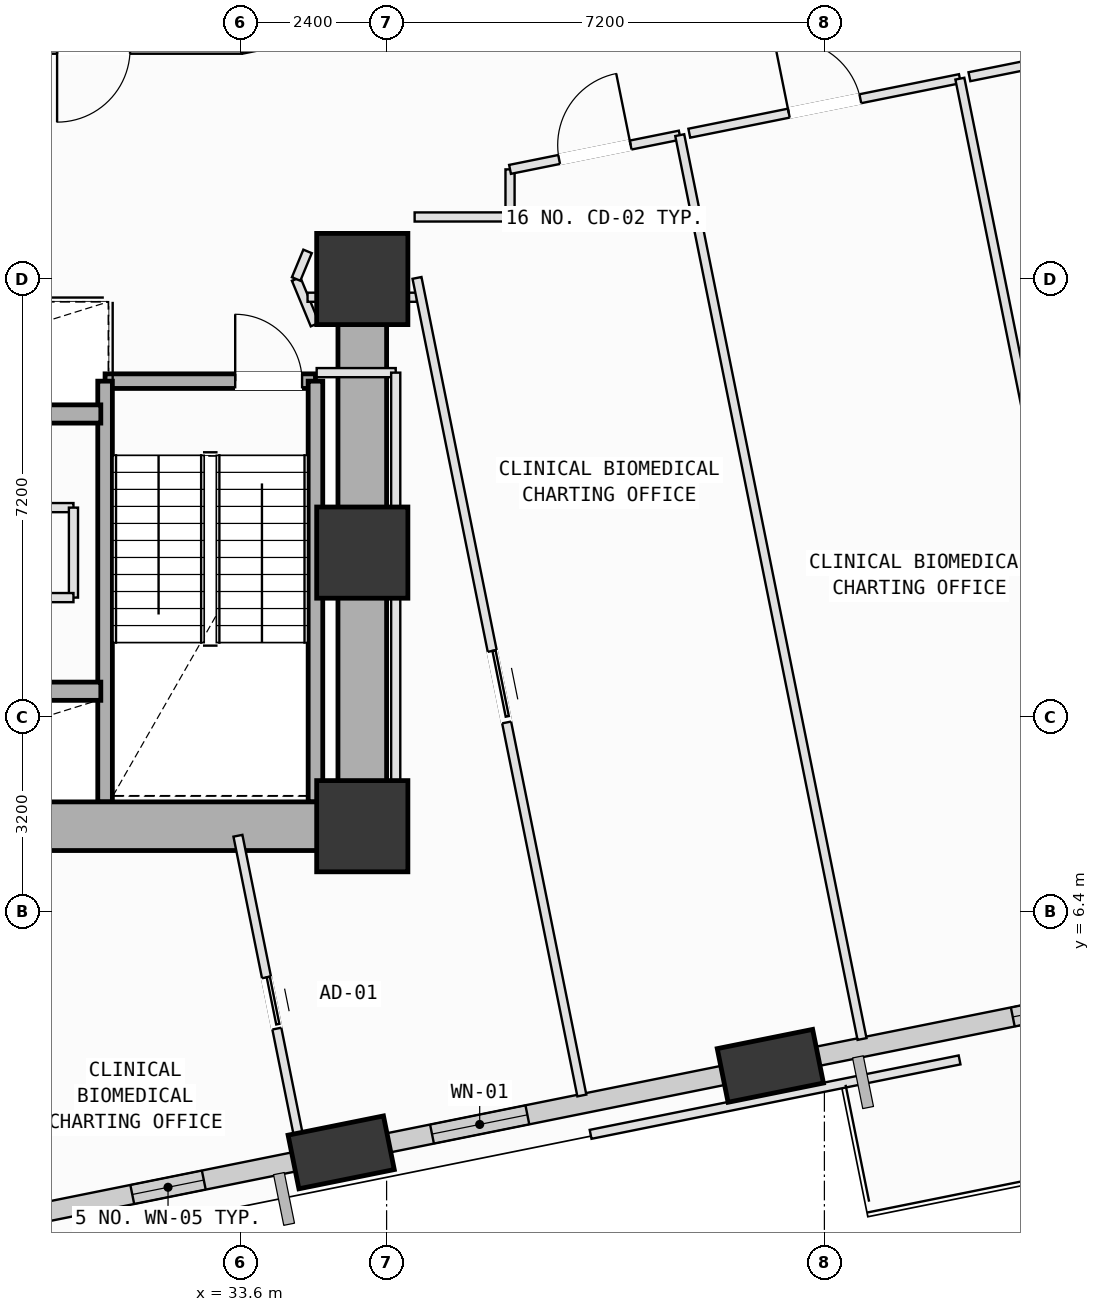
"""IFC4 building model, lengths in metres.
Left out: names, types, materials, properties, quantities, classifications, styles, units other than length and angle.
Written with IfcOpenShell. Run it as: python <this file> out.ifc"""

import sys

from ifc_helpers import new_model, si_unit, direction, frame, frame_2d, origin, origin_2d, place, context, subcontext, project, spatial, rectangle, extrude, element, fill, save


model = new_model("IFC4")
c1 = context("Model", 3, precision=1e-05, world=origin(), true_north=direction((0.0, 1.0)))
c2 = subcontext(c1, "Body", "Model", "MODEL_VIEW")
j1 = project(units=[si_unit("LENGTHUNIT", "METRE"), si_unit("PLANEANGLEUNIT", "RADIAN")], contexts=[c1])
p1 = place(None, origin())
s1 = spatial("IfcSite", under=j1, at=p1, CompositionType="ELEMENT")
p2 = place(p1, origin())
s2 = spatial("IfcBuilding", under=s1, at=p2, CompositionType="ELEMENT")
p3 = place(p2, frame((0.0, 0.0, 71.0)))
s3 = spatial("IfcBuildingStorey", under=s2, at=p3, CompositionType="ELEMENT", Elevation=71.0)
for number, where, z_axis, x_axis in (
    (1, (35.6, 7.8, 0.0), (0.0, 0.0, 1.0), (1.0, 0.0, 0.0)),
    (2, (35.6, 12.3, 0.0), (0.0, 0.0, 1.0), (1.0, 0.0, 0.0)),
    (3, (35.6, 16.8, 0.0), (0.0, 0.0, 1.0), (1.0, 0.0, 0.0)),
):
    element("IfcColumn", number, at=place(p3, frame(where, z_axis=z_axis, x_axis=x_axis)), inside=s3, PredefinedType="COLUMN", context=c2, shape_type="SweptSolid", body=[
        extrude(rectangle(XDim=1.5, YDim=1.5, at=origin_2d()), origin(), (0.0, 0.0, 1.0), 4.0),
    ])
p4 = place(p3, frame((35.253, 2.436, 0.002), z_axis=(0.092271488704, 0.007603122009, 0.995704858333), x_axis=(-0.27664462741, 0.960798033947, 0.018299947803)))
e4 = element("IfcColumn", 4, at=p4, inside=s3, PredefinedType="COLUMN", context=c2, shape_type="SweptSolid", body=[
    extrude(rectangle(XDim=1.6, YDim=0.9, at=origin_2d()), origin(), (0.0, 0.0, 1.0), 4.014),
])
p5 = place(p3, frame((42.311, 3.859, 0.002), z_axis=(0.086119922168, 0.036673949906, 0.995609552186), x_axis=(-0.565127396469, 0.824796170632, 0.018501423489)))
e5 = element("IfcColumn", 5, at=p5, inside=s3, PredefinedType="COLUMN", context=c2, shape_type="SweptSolid", body=[
    extrude(rectangle(XDim=1.6, YDim=0.9, at=origin_2d()), origin(), (0.0, 0.0, 1.0), 4.014),
])
p6 = place(p3, frame((34.839, 2.352, 0.0), z_axis=(0.0, 0.0, 1.0), x_axis=(-0.980280090352, -0.197613118135, 0.0)))
e6 = element("IfcWall", 6, at=p6, inside=s3, PredefinedType="SOLIDWALL", context=c2, shape_type="SweptSolid", body=[
    extrude(rectangle(XDim=5.99, YDim=0.32, at=frame_2d((2.995, 0.0))), origin(), (0.0, 0.0, 1.0), 3.165),
])
p7 = place(p6, frame((1.882, 0.0, 0.75)))
e7 = element("IfcOpeningElement", 7, at=p7, cuts=e6, PredefinedType="OPENING", context=c2, shape_type="SweptSolid", body=[
    extrude(rectangle(XDim=1.2, YDim=1.75, at=frame_2d((0.6, 0.875))), frame((0.0, 0.17, 0.0), z_axis=(0.0, -1.0, 0.0), x_axis=(1.0, 0.0, 0.0)), (0.0, 0.0, 1.0), 0.34),
])
p8 = place(p3, frame((41.897, 3.775, 0.0), z_axis=(0.0, 0.0, 1.0), x_axis=(-0.980270406687, -0.197661148871, 0.0)))
e8 = element("IfcWall", 8, at=p8, inside=s3, PredefinedType="SOLIDWALL", context=c2, shape_type="SweptSolid", body=[
    extrude(rectangle(XDim=5.986, YDim=0.32, at=frame_2d((2.993, 0.0))), origin(), (0.0, 0.0, 1.0), 3.165),
])
p9 = place(p8, frame((3.654, 0.0, 0.75)))
e9 = element("IfcOpeningElement", 9, at=p9, cuts=e8, PredefinedType="OPENING", context=c2, shape_type="SweptSolid", body=[
    extrude(rectangle(XDim=1.6, YDim=1.95, at=frame_2d((0.8, 0.975))), frame((0.0, 0.17, 0.0), z_axis=(0.0, -1.0, 0.0), x_axis=(1.0, 0.0, 0.0)), (0.0, 0.0, 1.0), 0.34),
])
p10 = place(p3, frame((48.961, 5.199, 0.0), z_axis=(0.0, 0.0, 1.0), x_axis=(-0.980270794901, -0.197659223574, 0.0)))
e10 = element("IfcWall", 10, at=p10, inside=s3, PredefinedType="SOLIDWALL", context=c2, shape_type="SweptSolid", body=[
    extrude(rectangle(XDim=5.993, YDim=0.32, at=frame_2d((2.997, 0.0))), origin(), (0.0, 0.0, 1.0), 3.165),
])
p11 = place(p10, frame((1.516, 0.0, 0.75)))
e11 = element("IfcOpeningElement", 11, at=p11, cuts=e10, PredefinedType="OPENING", context=c2, shape_type="SweptSolid", body=[
    extrude(rectangle(XDim=1.2, YDim=1.75, at=frame_2d((0.6, 0.875))), frame((0.0, 0.17, 0.0), z_axis=(0.0, -1.0, 0.0), x_axis=(1.0, 0.0, 0.0)), (0.0, 0.0, 1.0), 0.34),
])
p12 = place(p3, frame((31.37, 15.12, 0.0), z_axis=(0.0, 0.0, 1.0), x_axis=(1.0, 0.0, 0.0)))
e12 = element("IfcWall", 12, at=p12, inside=s3, PredefinedType="SOLIDWALL", context=c2, shape_type="SweptSolid", body=[
    extrude(rectangle(XDim=3.46, YDim=0.24, at=frame_2d((1.73, 0.0))), origin(), (0.0, 0.0, 1.0), 3.78),
])
p13 = place(p12, frame((2.14, 0.0, 0.0)))
e13 = element("IfcOpeningElement", 13, at=p13, cuts=e12, PredefinedType="OPENING", context=c2, shape_type="SweptSolid", body=[
    extrude(rectangle(XDim=1.1, YDim=2.15, at=frame_2d((0.55, 1.075))), frame((0.0, 0.13, 0.0), z_axis=(0.0, -1.0, 0.0), x_axis=(1.0, 0.0, 0.0)), (0.0, 0.0, 1.0), 0.26),
])
for number, where, z_axis, x_axis in (
    (14, (34.83, 15.12, 0.0), (0.0, 0.0, 1.0), (0.0, -1.0, 0.0)),
    (15, (31.37, 8.2, 0.0), (0.0, 0.0, 1.0), (0.0, 1.0, 0.0)),
):
    element("IfcWall", number, at=place(p3, frame(where, z_axis=z_axis, x_axis=x_axis)), inside=s3, PredefinedType="SOLIDWALL", context=c2, shape_type="SweptSolid", body=[
        extrude(rectangle(XDim=6.92, YDim=0.24, at=frame_2d((3.46, 0.0))), origin(), (0.0, 0.0, 1.0), 3.78),
    ])
p14 = place(p3, frame((24.8, 7.8, 0.0), z_axis=(0.0, 0.0, 1.0), x_axis=(1.0, 0.0, 0.0)))
e16 = element("IfcWall", 16, at=p14, inside=s3, PredefinedType="SHEAR", context=c2, shape_type="SweptSolid", body=[
    extrude(rectangle(XDim=10.8, YDim=0.8, at=frame_2d((5.4, 0.0))), origin(), (0.0, 0.0, 1.0), 3.78),
])
p15 = place(p3, frame((35.6, 7.8, 0.0), z_axis=(0.0, 0.0, 1.0), x_axis=(0.0, 1.0, 0.0)))
e17 = element("IfcWall", 17, at=p15, inside=s3, PredefinedType="SHEAR", context=c2, shape_type="SweptSolid", body=[
    extrude(rectangle(XDim=9.0, YDim=0.8, at=frame_2d((4.5, 0.0))), origin(), (0.0, 0.0, 1.0), 3.78),
])
p16 = place(p3, frame((25.85, 10.02, 0.0), z_axis=(0.0, 0.0, 1.0), x_axis=(1.0, 0.0, 0.0)))
e18 = element("IfcWall", 18, at=p16, inside=s3, PredefinedType="SOLIDWALL", context=c2, shape_type="SweptSolid", body=[
    extrude(rectangle(XDim=5.45, YDim=0.3, at=frame_2d((2.725, 0.0))), origin(), (0.0, 0.0, 1.0), 3.78),
])
p17 = place(p16, frame((0.34, 0.0, 0.0)))
e19 = element("IfcOpeningElement", 19, at=p17, cuts=e18, PredefinedType="OPENING", context=c2, shape_type="SweptSolid", body=[
    extrude(rectangle(XDim=1.12, YDim=2.15, at=frame_2d((0.56, 1.075))), frame((0.0, 0.16, 0.0), z_axis=(0.0, -1.0, 0.0), x_axis=(1.0, 0.0, 0.0)), (0.0, 0.0, 1.0), 0.32),
])
p18 = place(p16, frame((2.24, 0.0, 0.0)))
e20 = element("IfcOpeningElement", 20, at=p18, cuts=e18, PredefinedType="OPENING", context=c2, shape_type="SweptSolid", body=[
    extrude(rectangle(XDim=1.12, YDim=2.15, at=frame_2d((0.56, 1.075))), frame((0.0, 0.16, 0.0), z_axis=(0.0, -1.0, 0.0), x_axis=(1.0, 0.0, 0.0)), (0.0, 0.0, 1.0), 0.32),
])
p19 = place(p3, frame((25.85, 14.58, 0.0), z_axis=(0.0, 0.0, 1.0), x_axis=(1.0, 0.0, 0.0)))
e21 = element("IfcWall", 21, at=p19, inside=s3, PredefinedType="SOLIDWALL", context=c2, shape_type="SweptSolid", body=[
    extrude(rectangle(XDim=5.45, YDim=0.3, at=frame_2d((2.725, 0.0))), origin(), (0.0, 0.0, 1.0), 3.78),
])
p20 = place(p3, frame((26.45, 13.04, 0.0), z_axis=(0.0, 0.0, 1.0), x_axis=(1.0, 0.0, 0.0)))
e22 = element("IfcWall", 22, at=p20, inside=s3, PredefinedType="PARTITIONING", context=c2, shape_type="SweptSolid", body=[
    extrude(rectangle(XDim=4.4, YDim=0.15, at=frame_2d((2.2, 0.0))), origin(), (0.0, 0.0, 1.0), 3.78),
])
p21 = place(p20, frame((1.74, 0.0, 0.0)))
e23 = element("IfcOpeningElement", 23, at=p21, cuts=e22, PredefinedType="OPENING", context=c2, shape_type="SweptSolid", body=[
    extrude(rectangle(XDim=0.92, YDim=2.1, at=frame_2d((0.46, 1.05))), frame((0.0, 0.085, 0.0), z_axis=(0.0, -1.0, 0.0), x_axis=(1.0, 0.0, 0.0)), (0.0, 0.0, 1.0), 0.17),
])
p22 = place(p3, frame((30.85, 13.04, 0.0), z_axis=(0.0, 0.0, 1.0), x_axis=(0.0, -1.0, 0.0)))
e24 = element("IfcWall", 24, at=p22, inside=s3, PredefinedType="PARTITIONING", context=c2, shape_type="SweptSolid", body=[
    extrude(rectangle(XDim=1.48, YDim=0.15, at=frame_2d((0.74, 0.0))), origin(), (0.0, 0.0, 1.0), 3.78),
])
p23 = place(p3, frame((30.85, 11.56, 0.0), z_axis=(0.0, 0.0, 1.0), x_axis=(-1.0, 0.0, 0.0)))
e25 = element("IfcWall", 25, at=p23, inside=s3, PredefinedType="PARTITIONING", context=c2, shape_type="SweptSolid", body=[
    extrude(rectangle(XDim=4.4, YDim=0.15, at=frame_2d((2.2, 0.0))), origin(), (0.0, 0.0, 1.0), 3.78),
])
p24 = place(p3, frame((33.555, 7.643, 0.0), z_axis=(0.0, 0.0, 1.0), x_axis=(0.197717476779, -0.980259047077, 0.0)))
e26 = element("IfcWall", 26, at=p24, inside=s3, PredefinedType="PARTITIONING", context=c2, shape_type="SweptSolid", body=[
    extrude(rectangle(XDim=5.306, YDim=0.15, at=frame_2d((2.653, 0.0))), origin(), (0.0, 0.0, 1.0), 3.78),
])
p25 = place(p24, frame((2.376, 0.0, 0.0)))
e27 = element("IfcOpeningElement", 27, at=p25, cuts=e26, PredefinedType="OPENING", context=c2, shape_type="SweptSolid", body=[
    extrude(rectangle(XDim=0.86, YDim=2.06, at=frame_2d((0.43, 1.03))), frame((0.0, 0.085, 0.0), z_axis=(0.0, -1.0, 0.0), x_axis=(1.0, 0.0, 0.0)), (0.0, 0.0, 1.0), 0.17),
])
p26 = place(p3, frame((36.15, 15.26, 0.0), z_axis=(0.0, 0.0, 1.0), x_axis=(-1.0, 0.0, 0.0)))
e28 = element("IfcWall", 28, at=p26, inside=s3, PredefinedType="PARTITIONING", context=c2, shape_type="SweptSolid", body=[
    extrude(rectangle(XDim=1.3, YDim=0.15, at=frame_2d((0.65, 0.0))), origin(), (0.0, 0.0, 1.0), 3.78),
])
p27 = place(p3, frame((34.822, 16.05, 0.0), z_axis=(0.0, 0.0, 1.0), x_axis=(-0.382050639738, 0.924141389981, 0.0)))
e29 = element("IfcWall", 29, at=p27, inside=s3, PredefinedType="PARTITIONING", context=c2, shape_type="SweptSolid", body=[
    extrude(rectangle(XDim=0.812, YDim=0.15, at=frame_2d((0.406, 0.0))), origin(), (0.0, 0.0, 1.0), 3.78),
])
p28 = place(p3, frame((34.512, 16.8, 0.0), z_axis=(0.0, 0.0, 1.0), x_axis=(0.382673670509, 0.923883575944, 0.0)))
e30 = element("IfcWall", 30, at=p28, inside=s3, PredefinedType="PARTITIONING", context=c2, shape_type="SweptSolid", body=[
    extrude(rectangle(XDim=0.491, YDim=0.15, at=frame_2d((0.246, 0.0))), origin(), (0.0, 0.0, 1.0), 3.78),
])
p29 = place(p3, frame((34.7, 16.5, 0.0), z_axis=(0.0, 0.0, 1.0), x_axis=(1.0, 0.0, 0.0)))
e31 = element("IfcWall", 31, at=p29, inside=s3, PredefinedType="PARTITIONING", context=c2, shape_type="SweptSolid", body=[
    extrude(rectangle(XDim=1.8, YDim=0.15, at=frame_2d((0.9, 0.0))), origin(), (0.0, 0.0, 1.0), 2.865),
])
p30 = place(p3, frame((36.5, 16.818, 0.0), z_axis=(0.0, 0.0, 1.0), x_axis=(0.197625281774, -0.980277638225, 0.0)))
e32 = element("IfcWall", 32, at=p30, inside=s3, PredefinedType="PARTITIONING", context=c2, shape_type="SweptSolid", body=[
    extrude(rectangle(XDim=13.718, YDim=0.15, at=frame_2d((6.859, 0.0))), origin(), (0.0, 0.0, 1.0), 3.78),
])
p31 = place(p30, frame((6.259, 0.0, 0.0)))
e33 = element("IfcOpeningElement", 33, at=p31, cuts=e32, PredefinedType="OPENING", context=c2, shape_type="SweptSolid", body=[
    extrude(rectangle(XDim=1.2, YDim=2.15, at=frame_2d((0.6, 1.075))), frame((0.0, 0.085, 0.0), z_axis=(0.0, -1.0, 0.0), x_axis=(1.0, 0.0, 0.0)), (0.0, 0.0, 1.0), 0.17),
])
p32 = place(p3, frame((36.075, 2.367, 0.0), z_axis=(0.0, 0.0, 1.0), x_axis=(-0.980137701234, -0.198318144961, 0.0)))
e34 = element("IfcWall", 34, at=p32, inside=s3, PredefinedType="PARTITIONING", context=c2, shape_type="SweptSolid", body=[
    extrude(rectangle(XDim=1.215, YDim=0.15, at=frame_2d((0.607, 0.0))), origin(), (0.0, 0.0, 1.0), 3.165),
])
p33 = place(p3, frame((35.6, 7.5, 0.0), z_axis=(0.0, 0.0, 1.0), x_axis=(1.0, 0.0, 0.0)))
e35 = element("IfcWall", 35, at=p33, inside=s3, PredefinedType="PARTITIONING", context=c2, shape_type="SweptSolid", body=[
    extrude(rectangle(XDim=0.55, YDim=0.15, at=frame_2d((0.275, 0.0))), origin(), (0.0, 0.0, 1.0), 3.78),
])
p34 = place(p3, frame((36.15, 7.5, 0.0), z_axis=(0.0, 0.0, 1.0), x_axis=(0.0, 1.0, 0.0)))
e36 = element("IfcWall", 36, at=p34, inside=s3, PredefinedType="PARTITIONING", context=c2, shape_type="SweptSolid", body=[
    extrude(rectangle(XDim=7.76, YDim=0.15, at=frame_2d((3.88, 0.0))), origin(), (0.0, 0.0, 1.0), 3.78),
])
p35 = place(p3, frame((36.461, 17.82, 0.0), z_axis=(0.0, 0.0, 1.0), x_axis=(0.999999801036, 0.000630815203, 0.0)))
e37 = element("IfcWall", 37, at=p35, inside=s3, PredefinedType="PARTITIONING", context=c2, shape_type="SweptSolid", body=[
    extrude(rectangle(XDim=1.548, YDim=0.15, at=frame_2d((0.774, 0.0))), origin(), (0.0, 0.0, 1.0), 3.78),
])
p36 = place(p3, frame((38.03, 17.85, 0.0), z_axis=(0.0, 0.0, 1.0), x_axis=(0.0, 1.0, 0.0)))
e38 = element("IfcWall", 38, at=p36, inside=s3, PredefinedType="PARTITIONING", context=c2, shape_type="SweptSolid", body=[
    extrude(rectangle(XDim=0.753, YDim=0.15, at=frame_2d((0.376, 0.0))), origin(), (0.0, 0.0, 1.0), 3.78),
])
p37 = place(p3, frame((38.03, 18.603, 0.0), z_axis=(0.0, 0.0, 1.0), x_axis=(0.980256145054, 0.197731864109, 0.0)))
e39 = element("IfcWall", 39, at=p37, inside=s3, PredefinedType="PARTITIONING", context=c2, shape_type="SweptSolid", body=[
    extrude(rectangle(XDim=2.847, YDim=0.15, at=frame_2d((1.424, 0.0))), origin(), (0.0, 0.0, 1.0), 3.78),
])
p38 = place(p37, frame((0.823, 0.0, 0.0)))
e40 = element("IfcOpeningElement", 40, at=p38, cuts=e39, PredefinedType="OPENING", context=c2, shape_type="SweptSolid", body=[
    extrude(rectangle(XDim=1.2, YDim=2.15, at=frame_2d((0.6, 1.075))), frame((0.0, 0.085, 0.0), z_axis=(0.0, -1.0, 0.0), x_axis=(1.0, 0.0, 0.0)), (0.0, 0.0, 1.0), 0.17),
])
p39 = place(p3, frame((40.821, 19.166, 0.0), z_axis=(0.0, 0.0, 1.0), x_axis=(0.197691694235, -0.980264247043, 0.0)))
e41 = element("IfcWall", 41, at=p39, inside=s3, PredefinedType="PARTITIONING", context=c2, shape_type="SweptSolid", body=[
    extrude(rectangle(XDim=15.165, YDim=0.15, at=frame_2d((7.583, 0.0))), origin(), (0.0, 0.0, 1.0), 3.78),
])
p40 = place(p3, frame((40.978, 19.198, 0.0), z_axis=(0.0, 0.0, 1.0), x_axis=(0.980283759532, 0.197594915923, 0.0)))
e42 = element("IfcWall", 42, at=p40, inside=s3, PredefinedType="PARTITIONING", context=c2, shape_type="SweptSolid", body=[
    extrude(rectangle(XDim=4.54, YDim=0.15, at=frame_2d((2.27, 0.0))), origin(), (0.0, 0.0, 1.0), 3.78),
])
p41 = place(p40, frame((1.67, 0.0, 0.0)))
e43 = element("IfcOpeningElement", 43, at=p41, cuts=e42, PredefinedType="OPENING", context=c2, shape_type="SweptSolid", body=[
    extrude(rectangle(XDim=1.2, YDim=2.15, at=frame_2d((0.6, 1.075))), frame((0.0, 0.085, 0.0), z_axis=(0.0, -1.0, 0.0), x_axis=(1.0, 0.0, 0.0)), (0.0, 0.0, 1.0), 0.17),
])
p42 = place(p3, frame((45.428, 20.095, 0.0), z_axis=(0.0, 0.0, 1.0), x_axis=(0.197691694235, -0.980264247043, 0.0)))
e44 = element("IfcWall", 44, at=p42, inside=s3, PredefinedType="PARTITIONING", context=c2, shape_type="SweptSolid", body=[
    extrude(rectangle(XDim=15.165, YDim=0.15, at=frame_2d((7.583, 0.0))), origin(), (0.0, 0.0, 1.0), 3.78),
])
p43 = place(p3, frame((45.585, 20.127, 0.0), z_axis=(0.0, 0.0, 1.0), x_axis=(0.980292156273, 0.197553254465, 0.0)))
e45 = element("IfcWall", 45, at=p43, inside=s3, PredefinedType="PARTITIONING", context=c2, shape_type="SweptSolid", body=[
    extrude(rectangle(XDim=4.541, YDim=0.15, at=frame_2d((2.27, 0.0))), origin(), (0.0, 0.0, 1.0), 3.78),
])
p44 = place(p43, frame((1.67, 0.0, 0.0)))
e46 = element("IfcOpeningElement", 46, at=p44, cuts=e45, PredefinedType="OPENING", context=c2, shape_type="SweptSolid", body=[
    extrude(rectangle(XDim=1.2, YDim=2.15, at=frame_2d((0.6, 1.075))), frame((0.0, 0.085, 0.0), z_axis=(0.0, -1.0, 0.0), x_axis=(1.0, 0.0, 0.0)), (0.0, 0.0, 1.0), 0.17),
])
p45 = place(p3, frame((36.94, 21.25, 0.0), z_axis=(0.0, 0.0, 1.0), x_axis=(-0.980288826058, -0.197569778825, 0.0)))
e47 = element("IfcWall", 47, at=p45, inside=s3, PredefinedType="PARTITIONING", context=c2, shape_type="SweptSolid", body=[
    extrude(rectangle(XDim=3.391, YDim=0.15, at=frame_2d((1.695, 0.0))), origin(), (0.0, 0.0, 1.0), 3.78),
])
p46 = place(p3, frame((33.616, 20.58, 0.0), z_axis=(0.0, 0.0, 1.0), x_axis=(-1.0, 0.0, 0.0)))
e48 = element("IfcWall", 48, at=p46, inside=s3, PredefinedType="PARTITIONING", context=c2, shape_type="SweptSolid", body=[
    extrude(rectangle(XDim=4.87, YDim=0.15, at=frame_2d((2.435, 0.0))), origin(), (0.0, 0.0, 1.0), 3.78),
])
p47 = place(p46, frame((1.835, 0.0, 0.0)))
e49 = element("IfcOpeningElement", 49, at=p47, cuts=e48, PredefinedType="OPENING", context=c2, shape_type="SweptSolid", body=[
    extrude(rectangle(XDim=1.2, YDim=2.15, at=frame_2d((0.6, 1.075))), frame((0.0, 0.085, 0.0), z_axis=(0.0, -1.0, 0.0), x_axis=(1.0, 0.0, 0.0)), (0.0, 0.0, 1.0), 0.17),
])
p48 = place(p3, frame((45.423, 3.956, 0.0), z_axis=(0.0, 0.0, 1.0), x_axis=(-0.980253190715, -0.197746509686, 0.0)))
e50 = element("IfcWall", 50, at=p48, inside=s3, PredefinedType="PARTITIONING", context=c2, shape_type="SweptSolid", body=[
    extrude(rectangle(XDim=6.19, YDim=0.15, at=frame_2d((3.095, 0.0))), origin(), (0.0, 0.0, 1.0), 3.78),
])
p49 = place(p7, origin())
e51 = element("IfcWindow", 51, at=p49, inside=s3, PartitioningType="SINGLE_PANEL", PredefinedType="WINDOW", context=c2, shape_type="SweptSolid", body=[
    extrude(rectangle(XDim=1.2, YDim=1.75, at=frame_2d((0.6, 0.875))), frame((0.0, 0.03, 0.0), z_axis=(0.0, -1.0, 0.0), x_axis=(1.0, 0.0, 0.0)), (0.0, 0.0, 1.0), 0.06),
])
fill(e7, e51)
p50 = place(p9, origin())
e52 = element("IfcWindow", 52, at=p50, inside=s3, PartitioningType="SINGLE_PANEL", PredefinedType="WINDOW", context=c2, shape_type="SweptSolid", body=[
    extrude(rectangle(XDim=1.6, YDim=1.95, at=frame_2d((0.8, 0.975))), frame((0.0, 0.03, 0.0), z_axis=(0.0, -1.0, 0.0), x_axis=(1.0, 0.0, 0.0)), (0.0, 0.0, 1.0), 0.06),
])
fill(e9, e52)
p51 = place(p11, origin())
e53 = element("IfcWindow", 53, at=p51, inside=s3, PartitioningType="SINGLE_PANEL", PredefinedType="WINDOW", context=c2, shape_type="SweptSolid", body=[
    extrude(rectangle(XDim=1.2, YDim=1.75, at=frame_2d((0.6, 0.875))), frame((0.0, 0.03, 0.0), z_axis=(0.0, -1.0, 0.0), x_axis=(1.0, 0.0, 0.0)), (0.0, 0.0, 1.0), 0.06),
])
fill(e11, e53)
p52 = place(p13, origin())
e54 = element("IfcDoor", 54, at=p52, inside=s3, OperationType="SINGLE_SWING_LEFT", PredefinedType="DOOR", context=c2, shape_type="SweptSolid", body=[
    extrude(rectangle(XDim=1.1, YDim=2.15, at=frame_2d((0.55, 1.075))), frame((0.0, 0.025, 0.0), z_axis=(0.0, -1.0, 0.0), x_axis=(1.0, 0.0, 0.0)), (0.0, 0.0, 1.0), 0.05),
])
fill(e13, e54)
p53 = place(p38, origin())
e55 = element("IfcDoor", 55, at=p53, inside=s3, OperationType="SINGLE_SWING_RIGHT", PredefinedType="DOOR", context=c2, shape_type="SweptSolid", body=[
    extrude(rectangle(XDim=1.2, YDim=2.15, at=frame_2d((0.6, 1.075))), frame((0.0, 0.025, 0.0), z_axis=(0.0, -1.0, 0.0), x_axis=(1.0, 0.0, 0.0)), (0.0, 0.0, 1.0), 0.05),
])
fill(e40, e55)
p54 = place(p41, origin())
e56 = element("IfcDoor", 56, at=p54, inside=s3, OperationType="SINGLE_SWING_LEFT", PredefinedType="DOOR", context=c2, shape_type="SweptSolid", body=[
    extrude(rectangle(XDim=1.2, YDim=2.15, at=frame_2d((0.6, 1.075))), frame((0.0, 0.025, 0.0), z_axis=(0.0, -1.0, 0.0), x_axis=(1.0, 0.0, 0.0)), (0.0, 0.0, 1.0), 0.05),
])
fill(e43, e56)
p55 = place(p31, origin())
e57 = element("IfcDoor", 57, at=p55, inside=s3, OperationType="SLIDING_TO_LEFT", PredefinedType="DOOR", context=c2, shape_type="SweptSolid", body=[
    extrude(rectangle(XDim=1.2, YDim=2.15, at=frame_2d((0.6, 1.075))), frame((0.0, 0.025, 0.0), z_axis=(0.0, -1.0, 0.0), x_axis=(1.0, 0.0, 0.0)), (0.0, 0.0, 1.0), 0.05),
])
fill(e33, e57)
p56 = place(p25, origin())
e58 = element("IfcDoor", 58, at=p56, inside=s3, OperationType="SLIDING_TO_LEFT", PredefinedType="DOOR", context=c2, shape_type="SweptSolid", body=[
    extrude(rectangle(XDim=0.86, YDim=2.06, at=frame_2d((0.43, 1.03))), frame((0.0, 0.025, 0.0), z_axis=(0.0, -1.0, 0.0), x_axis=(1.0, 0.0, 0.0)), (0.0, 0.0, 1.0), 0.05),
])
fill(e27, e58)
save(model, sys.argv[1])
